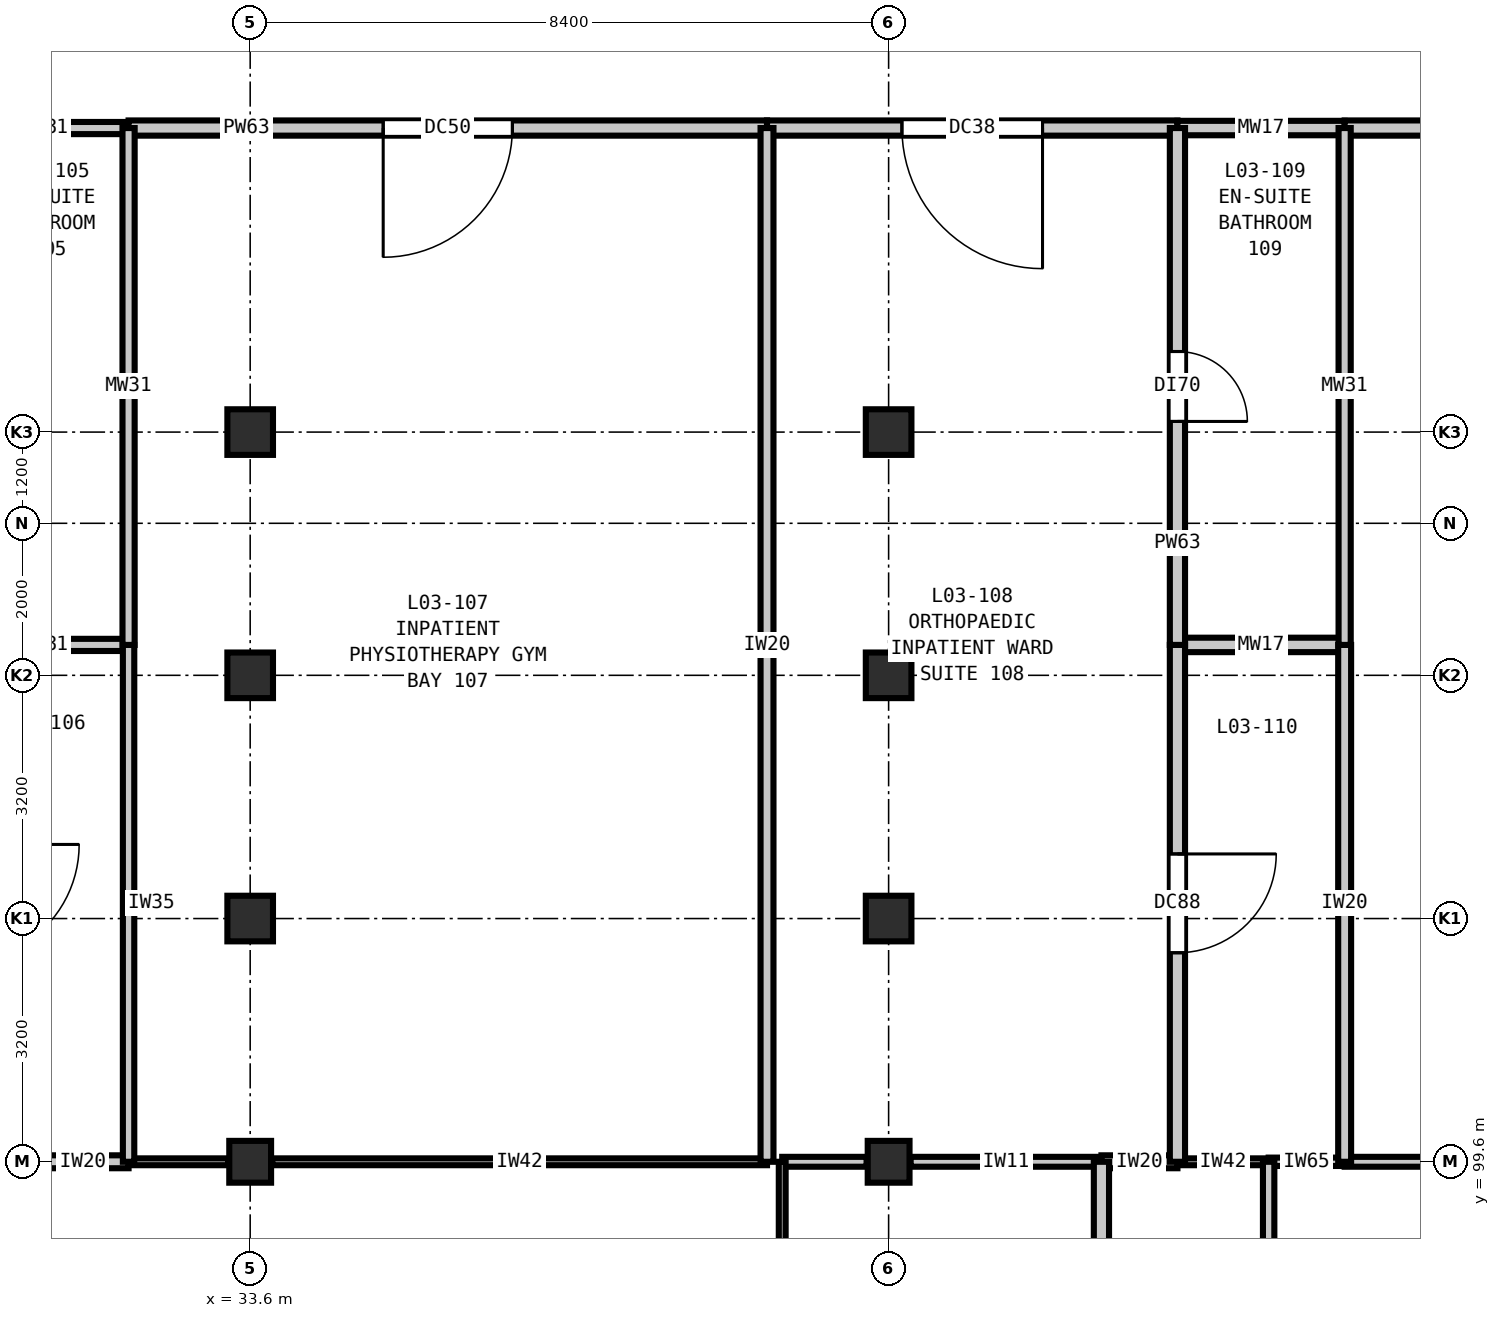
"""IFC4 building model, lengths in metres.
Left out: names, types, materials, properties, quantities, classifications, styles, units other than length and angle.
Written with IfcOpenShell. Run it as: python <this file> out.ifc"""

import sys

from ifc_helpers import new_model, si_unit, direction, frame, frame_2d, origin, origin_2d, place, context, subcontext, project, spatial, rectangle, extrude, element, fill, save


model = new_model("IFC4")
c1 = context("Model", 3, precision=1e-05, world=origin(), true_north=direction((0.0, 1.0)))
c2 = subcontext(c1, "Body", "Model", "MODEL_VIEW")
j1 = project(units=[si_unit("LENGTHUNIT", "METRE"), si_unit("PLANEANGLEUNIT", "RADIAN")], contexts=[c1])
p1 = place(None, origin())
s1 = spatial("IfcSite", under=j1, at=p1, CompositionType="ELEMENT")
p2 = place(p1, origin())
s2 = spatial("IfcBuilding", under=s1, at=p2, CompositionType="ELEMENT")
p3 = place(p2, frame((0.0, 0.0, 16.2)))
s3 = spatial("IfcBuildingStorey", under=s2, at=p3, CompositionType="ELEMENT", Elevation=16.2)
p4 = place(p3, frame((33.6, 99.6, 0.0), z_axis=(0.0, 0.0, 1.0), x_axis=(1.0, 0.0, 0.0)))
e1 = element("IfcColumn", 1, at=p4, inside=s3, PredefinedType="COLUMN", context=c2, shape_type="SweptSolid", body=[
    extrude(rectangle(XDim=0.55, YDim=0.55, at=origin_2d()), origin(), (0.0, 0.0, 1.0), 4.2),
])
for number, where, z_axis, x_axis in (
    (2, (33.6, 102.8, 0.0), (0.0, 0.0, 1.0), (1.0, 0.0, 0.0)),
    (3, (33.6, 106.0, 0.0), (0.0, 0.0, 1.0), (1.0, 0.0, 0.0)),
    (4, (33.6, 109.2, 0.0), (0.0, 0.0, 1.0), (1.0, 0.0, 0.0)),
):
    element("IfcColumn", number, at=place(p3, frame(where, z_axis=z_axis, x_axis=x_axis)), inside=s3, PredefinedType="COLUMN", context=c2, shape_type="SweptSolid", body=[
        extrude(rectangle(XDim=0.6, YDim=0.6, at=origin_2d()), origin(), (0.0, 0.0, 1.0), 4.2),
    ])
p5 = place(p3, frame((42.0, 99.6, 0.0), z_axis=(0.0, 0.0, 1.0), x_axis=(1.0, 0.0, 0.0)))
e5 = element("IfcColumn", 5, at=p5, inside=s3, PredefinedType="COLUMN", context=c2, shape_type="SweptSolid", body=[
    extrude(rectangle(XDim=0.55, YDim=0.55, at=origin_2d()), origin(), (0.0, 0.0, 1.0), 4.2),
])
for number, where, z_axis, x_axis in (
    (6, (42.0, 102.8, 0.0), (0.0, 0.0, 1.0), (1.0, 0.0, 0.0)),
    (7, (42.0, 106.0, 0.0), (0.0, 0.0, 1.0), (1.0, 0.0, 0.0)),
    (8, (42.0, 109.2, 0.0), (0.0, 0.0, 1.0), (1.0, 0.0, 0.0)),
):
    element("IfcColumn", number, at=place(p3, frame(where, z_axis=z_axis, x_axis=x_axis)), inside=s3, PredefinedType="COLUMN", context=c2, shape_type="SweptSolid", body=[
        extrude(rectangle(XDim=0.6, YDim=0.6, at=origin_2d()), origin(), (0.0, 0.0, 1.0), 4.2),
    ])
p6 = place(p3, frame((30.8, 99.6, 0.0), z_axis=(0.0, 0.0, 1.0), x_axis=(1.0, 0.0, 0.0)))
e9 = element("IfcWall", 9, at=p6, inside=s3, PredefinedType="PARTITIONING", context=c2, shape_type="SweptSolid", body=[
    extrude(rectangle(XDim=1.2, YDim=0.17, at=frame_2d((0.6, 0.0))), origin(), (0.0, 0.0, 1.0), 3.535),
])
p7 = place(p3, frame((33.89, 99.6, 0.0), z_axis=(0.0, 0.0, 1.0), x_axis=(1.0, 0.0, 0.0)))
e10 = element("IfcWall", 10, at=p7, inside=s3, PredefinedType="PARTITIONING", context=c2, shape_type="SweptSolid", body=[
    extrude(rectangle(XDim=6.51, YDim=0.09, at=frame_2d((3.255, 0.0))), origin(), (0.0, 0.0, 1.0), 3.535),
])
p8 = place(p3, frame((32.0, 99.6, 0.0), z_axis=(0.0, 0.0, 1.0), x_axis=(1.0, 0.0, 0.0)))
e11 = element("IfcWall", 11, at=p8, inside=s3, PredefinedType="PARTITIONING", context=c2, shape_type="SweptSolid", body=[
    extrude(rectangle(XDim=1.31, YDim=0.09, at=frame_2d((0.655, 0.0))), origin(), (0.0, 0.0, 1.0), 3.535),
])
p9 = place(p3, frame((42.29, 99.6, 0.0), z_axis=(0.0, 0.0, 1.0), x_axis=(1.0, 0.0, 0.0)))
e12 = element("IfcWall", 12, at=p9, inside=s3, PredefinedType="PARTITIONING", context=c2, shape_type="SweptSolid", body=[
    extrude(rectangle(XDim=2.51, YDim=0.13, at=frame_2d((1.255, 0.0))), origin(), (0.0, 0.0, 1.0), 3.535),
])
p10 = place(p3, frame((40.6, 99.6, 0.0), z_axis=(0.0, 0.0, 1.0), x_axis=(1.0, 0.0, 0.0)))
e13 = element("IfcWall", 13, at=p10, inside=s3, PredefinedType="PARTITIONING", context=c2, shape_type="SweptSolid", body=[
    extrude(rectangle(XDim=1.11, YDim=0.13, at=frame_2d((0.555, 0.0))), origin(), (0.0, 0.0, 1.0), 3.535),
])
p11 = place(p3, frame((44.8, 99.6, 0.0), z_axis=(0.0, 0.0, 1.0), x_axis=(1.0, 0.0, 0.0)))
e14 = element("IfcWall", 14, at=p11, inside=s3, PredefinedType="PARTITIONING", context=c2, shape_type="SweptSolid", body=[
    extrude(rectangle(XDim=1.0, YDim=0.17, at=frame_2d((0.5, 0.0))), origin(), (0.0, 0.0, 1.0), 3.535),
])
p12 = place(p3, frame((45.8, 99.6, 0.0), z_axis=(0.0, 0.0, 1.0), x_axis=(1.0, 0.0, 0.0)))
e15 = element("IfcWall", 15, at=p12, inside=s3, PredefinedType="PARTITIONING", context=c2, shape_type="SweptSolid", body=[
    extrude(rectangle(XDim=1.2, YDim=0.09, at=frame_2d((0.6, 0.0))), origin(), (0.0, 0.0, 1.0), 3.535),
])
p13 = place(p3, frame((47.0, 99.6, 0.0), z_axis=(0.0, 0.0, 1.0), x_axis=(1.0, 0.0, 0.0)))
e16 = element("IfcWall", 16, at=p13, inside=s3, PredefinedType="PARTITIONING", context=c2, shape_type="SweptSolid", body=[
    extrude(rectangle(XDim=1.0, YDim=0.11, at=frame_2d((0.5, 0.0))), origin(), (0.0, 0.0, 1.0), 3.535),
])
p14 = place(p3, frame((48.0, 99.6, 0.0), z_axis=(0.0, 0.0, 1.0), x_axis=(1.0, 0.0, 0.0)))
e17 = element("IfcWall", 17, at=p14, inside=s3, PredefinedType="PARTITIONING", context=c2, shape_type="SweptSolid", body=[
    extrude(rectangle(XDim=2.11, YDim=0.13, at=frame_2d((1.055, 0.0))), origin(), (0.0, 0.0, 1.0), 3.535),
])
p15 = place(p3, frame((29.8, 106.4, 0.0), z_axis=(0.0, 0.0, 1.0), x_axis=(1.0, 0.0, 0.0)))
e18 = element("IfcWall", 18, at=p15, inside=s3, PredefinedType="PLUMBINGWALL", context=c2, shape_type="SweptSolid", body=[
    extrude(rectangle(XDim=2.2, YDim=0.16, at=frame_2d((1.1, 0.0))), origin(), (0.0, 0.0, 1.0), 3.89),
])
p16 = place(p3, frame((45.8, 106.4, 0.0), z_axis=(0.0, 0.0, 1.0), x_axis=(1.0, 0.0, 0.0)))
e19 = element("IfcWall", 19, at=p16, inside=s3, PredefinedType="PLUMBINGWALL", context=c2, shape_type="SweptSolid", body=[
    extrude(rectangle(XDim=2.2, YDim=0.19, at=frame_2d((1.1, 0.0))), origin(), (0.0, 0.0, 1.0), 3.89),
])
p17 = place(p3, frame((29.8, 113.2, 0.0), z_axis=(0.0, 0.0, 1.0), x_axis=(1.0, 0.0, 0.0)))
e20 = element("IfcWall", 20, at=p17, inside=s3, PredefinedType="PLUMBINGWALL", context=c2, shape_type="SweptSolid", body=[
    extrude(rectangle(XDim=2.2, YDim=0.16, at=frame_2d((1.1, 0.0))), origin(), (0.0, 0.0, 1.0), 3.89),
])
p18 = place(p3, frame((32.0, 113.2, 0.0), z_axis=(0.0, 0.0, 1.0), x_axis=(1.0, 0.0, 0.0)))
e21 = element("IfcWall", 21, at=p18, inside=s3, PredefinedType="PARTITIONING", context=c2, shape_type="SweptSolid", body=[
    extrude(rectangle(XDim=8.4, YDim=0.2, at=frame_2d((4.2, 0.0))), origin(), (0.0, 0.0, 1.0), 3.89),
])
p19 = place(p18, frame((3.35, 0.0, 0.0)))
e22 = element("IfcOpeningElement", 22, at=p19, cuts=e21, PredefinedType="OPENING", context=c2, shape_type="SweptSolid", body=[
    extrude(rectangle(XDim=1.7, YDim=2.3, at=frame_2d((0.85, 1.15))), frame((0.0, 0.11, 0.0), z_axis=(0.0, -1.0, 0.0), x_axis=(1.0, 0.0, 0.0)), (0.0, 0.0, 1.0), 0.22),
])
p20 = place(p3, frame((40.4, 113.2, 0.0), z_axis=(0.0, 0.0, 1.0), x_axis=(1.0, 0.0, 0.0)))
e23 = element("IfcWall", 23, at=p20, inside=s3, PredefinedType="PARTITIONING", context=c2, shape_type="SweptSolid", body=[
    extrude(rectangle(XDim=5.4, YDim=0.2, at=frame_2d((2.7, 0.0))), origin(), (0.0, 0.0, 1.0), 3.89),
])
p21 = place(p20, frame((1.775, 0.0, 0.0)))
e24 = element("IfcOpeningElement", 24, at=p21, cuts=e23, PredefinedType="OPENING", context=c2, shape_type="SweptSolid", body=[
    extrude(rectangle(XDim=1.85, YDim=2.3, at=frame_2d((0.925, 1.15))), frame((0.0, 0.11, 0.0), z_axis=(0.0, -1.0, 0.0), x_axis=(1.0, 0.0, 0.0)), (0.0, 0.0, 1.0), 0.22),
])
p22 = place(p3, frame((45.8, 113.2, 0.0), z_axis=(0.0, 0.0, 1.0), x_axis=(1.0, 0.0, 0.0)))
e25 = element("IfcWall", 25, at=p22, inside=s3, PredefinedType="PLUMBINGWALL", context=c2, shape_type="SweptSolid", body=[
    extrude(rectangle(XDim=2.2, YDim=0.19, at=frame_2d((1.1, 0.0))), origin(), (0.0, 0.0, 1.0), 3.89),
])
p23 = place(p3, frame((48.0, 113.2, 0.0), z_axis=(0.0, 0.0, 1.0), x_axis=(1.0, 0.0, 0.0)))
e26 = element("IfcWall", 26, at=p23, inside=s3, PredefinedType="PARTITIONING", context=c2, shape_type="SweptSolid", body=[
    extrude(rectangle(XDim=8.4, YDim=0.2, at=frame_2d((4.2, 0.0))), origin(), (0.0, 0.0, 1.0), 3.89),
])
p24 = place(p23, frame((3.575, 0.0, 0.0)))
e27 = element("IfcOpeningElement", 27, at=p24, cuts=e26, PredefinedType="OPENING", context=c2, shape_type="SweptSolid", body=[
    extrude(rectangle(XDim=1.25, YDim=2.15, at=frame_2d((0.625, 1.075))), frame((0.0, 0.11, 0.0), z_axis=(0.0, -1.0, 0.0), x_axis=(1.0, 0.0, 0.0)), (0.0, 0.0, 1.0), 0.22),
])
p25 = place(p3, frame((32.0, 99.6, 0.0), z_axis=(0.0, 0.0, 1.0), x_axis=(0.0, 1.0, 0.0)))
e28 = element("IfcWall", 28, at=p25, inside=s3, PredefinedType="PARTITIONING", context=c2, shape_type="SweptSolid", body=[
    extrude(rectangle(XDim=6.8, YDim=0.15, at=frame_2d((3.4, 0.0))), origin(), (0.0, 0.0, 1.0), 3.89),
])
p26 = place(p3, frame((32.0, 106.4, 0.0), z_axis=(0.0, 0.0, 1.0), x_axis=(0.0, 1.0, 0.0)))
e29 = element("IfcWall", 29, at=p26, inside=s3, PredefinedType="PLUMBINGWALL", context=c2, shape_type="SweptSolid", body=[
    extrude(rectangle(XDim=6.8, YDim=0.16, at=frame_2d((3.4, 0.0))), origin(), (0.0, 0.0, 1.0), 3.89),
])
p27 = place(p3, frame((40.4, 99.6, 0.0), z_axis=(0.0, 0.0, 1.0), x_axis=(0.0, 1.0, 0.0)))
e30 = element("IfcWall", 30, at=p27, inside=s3, PredefinedType="PARTITIONING", context=c2, shape_type="SweptSolid", body=[
    extrude(rectangle(XDim=13.6, YDim=0.17, at=frame_2d((6.8, 0.0))), origin(), (0.0, 0.0, 1.0), 3.89),
])
p28 = place(p3, frame((40.6, 88.6, 0.0), z_axis=(0.0, 0.0, 1.0), x_axis=(0.0, 1.0, 0.0)))
e31 = element("IfcWall", 31, at=p28, inside=s3, PredefinedType="PARTITIONING", context=c2, shape_type="SweptSolid", body=[
    extrude(rectangle(XDim=11.0, YDim=0.09, at=frame_2d((5.5, 0.0))), origin(), (0.0, 0.0, 1.0), 3.89),
])
p29 = place(p3, frame((44.8, 94.1, 0.0), z_axis=(0.0, 0.0, 1.0), x_axis=(0.0, 1.0, 0.0)))
e32 = element("IfcWall", 32, at=p29, inside=s3, PredefinedType="PARTITIONING", context=c2, shape_type="SweptSolid", body=[
    extrude(rectangle(XDim=5.5, YDim=0.2, at=frame_2d((2.75, 0.0))), origin(), (0.0, 0.0, 1.0), 3.89),
])
p30 = place(p29, frame((2.125, 0.0, 0.0)))
e33 = element("IfcOpeningElement", 33, at=p30, cuts=e32, PredefinedType="OPENING", context=c2, shape_type="SweptSolid", body=[
    extrude(rectangle(XDim=1.25, YDim=2.15, at=frame_2d((0.625, 1.075))), frame((0.0, 0.11, 0.0), z_axis=(0.0, -1.0, 0.0), x_axis=(1.0, 0.0, 0.0)), (0.0, 0.0, 1.0), 0.22),
])
p31 = place(p3, frame((45.8, 99.6, 0.0), z_axis=(0.0, 0.0, 1.0), x_axis=(0.0, 1.0, 0.0)))
e34 = element("IfcWall", 34, at=p31, inside=s3, PredefinedType="PARTITIONING", context=c2, shape_type="SweptSolid", body=[
    extrude(rectangle(XDim=6.8, YDim=0.2, at=frame_2d((3.4, 0.0))), origin(), (0.0, 0.0, 1.0), 3.89),
])
p32 = place(p31, frame((2.75, 0.0, 0.0)))
e35 = element("IfcOpeningElement", 35, at=p32, cuts=e34, PredefinedType="OPENING", context=c2, shape_type="SweptSolid", body=[
    extrude(rectangle(XDim=1.3, YDim=2.2, at=frame_2d((0.65, 1.1))), frame((0.0, 0.11, 0.0), z_axis=(0.0, -1.0, 0.0), x_axis=(1.0, 0.0, 0.0)), (0.0, 0.0, 1.0), 0.22),
])
p33 = place(p3, frame((45.8, 106.4, 0.0), z_axis=(0.0, 0.0, 1.0), x_axis=(0.0, 1.0, 0.0)))
e36 = element("IfcWall", 36, at=p33, inside=s3, PredefinedType="PARTITIONING", context=c2, shape_type="SweptSolid", body=[
    extrude(rectangle(XDim=6.8, YDim=0.2, at=frame_2d((3.4, 0.0))), origin(), (0.0, 0.0, 1.0), 3.89),
])
p34 = place(p33, frame((2.94, 0.0, 0.0)))
e37 = element("IfcOpeningElement", 37, at=p34, cuts=e36, PredefinedType="OPENING", context=c2, shape_type="SweptSolid", body=[
    extrude(rectangle(XDim=0.92, YDim=2.1, at=frame_2d((0.46, 1.05))), frame((0.0, 0.11, 0.0), z_axis=(0.0, -1.0, 0.0), x_axis=(1.0, 0.0, 0.0)), (0.0, 0.0, 1.0), 0.22),
])
p35 = place(p3, frame((47.0, 94.1, 0.0), z_axis=(0.0, 0.0, 1.0), x_axis=(0.0, 1.0, 0.0)))
e38 = element("IfcWall", 38, at=p35, inside=s3, PredefinedType="PARTITIONING", context=c2, shape_type="SweptSolid", body=[
    extrude(rectangle(XDim=5.5, YDim=0.15, at=frame_2d((2.75, 0.0))), origin(), (0.0, 0.0, 1.0), 3.89),
])
p36 = place(p3, frame((48.0, 99.6, 0.0), z_axis=(0.0, 0.0, 1.0), x_axis=(0.0, 1.0, 0.0)))
e39 = element("IfcWall", 39, at=p36, inside=s3, PredefinedType="PARTITIONING", context=c2, shape_type="SweptSolid", body=[
    extrude(rectangle(XDim=6.8, YDim=0.17, at=frame_2d((3.4, 0.0))), origin(), (0.0, 0.0, 1.0), 3.89),
])
p37 = place(p3, frame((48.0, 106.4, 0.0), z_axis=(0.0, 0.0, 1.0), x_axis=(0.0, 1.0, 0.0)))
e40 = element("IfcWall", 40, at=p37, inside=s3, PredefinedType="PLUMBINGWALL", context=c2, shape_type="SweptSolid", body=[
    extrude(rectangle(XDim=6.8, YDim=0.16, at=frame_2d((3.4, 0.0))), origin(), (0.0, 0.0, 1.0), 3.89),
])
p38 = place(p19, frame((1.7, 0.0, 0.0), z_axis=(0.0, 0.0, 1.0), x_axis=(-1.0, 0.0, 0.0)))
e41 = element("IfcDoor", 41, at=p38, inside=s3, OperationType="SINGLE_SWING_RIGHT", PredefinedType="DOOR", context=c2, shape_type="SweptSolid", body=[
    extrude(rectangle(XDim=1.7, YDim=2.3, at=frame_2d((0.85, 1.15))), frame((0.0, 0.025, 0.0), z_axis=(0.0, -1.0, 0.0), x_axis=(1.0, 0.0, 0.0)), (0.0, 0.0, 1.0), 0.05),
])
fill(e22, e41)
p39 = place(p21, frame((1.85, 0.0, 0.0), z_axis=(0.0, 0.0, 1.0), x_axis=(-1.0, 0.0, 0.0)))
e42 = element("IfcDoor", 42, at=p39, inside=s3, OperationType="SINGLE_SWING_LEFT", PredefinedType="DOOR", context=c2, shape_type="SweptSolid", body=[
    extrude(rectangle(XDim=1.85, YDim=2.3, at=frame_2d((0.925, 1.15))), frame((0.0, 0.025, 0.0), z_axis=(0.0, -1.0, 0.0), x_axis=(1.0, 0.0, 0.0)), (0.0, 0.0, 1.0), 0.05),
])
fill(e24, e42)
p40 = place(p32, frame((1.3, 0.0, 0.0), z_axis=(0.0, 0.0, 1.0), x_axis=(-1.0, 0.0, 0.0)))
e43 = element("IfcDoor", 43, at=p40, inside=s3, OperationType="SINGLE_SWING_LEFT", PredefinedType="DOOR", context=c2, shape_type="SweptSolid", body=[
    extrude(rectangle(XDim=1.3, YDim=2.2, at=frame_2d((0.65, 1.1))), frame((0.0, 0.025, 0.0), z_axis=(0.0, -1.0, 0.0), x_axis=(1.0, 0.0, 0.0)), (0.0, 0.0, 1.0), 0.05),
])
fill(e35, e43)
p41 = place(p34, frame((0.92, 0.0, 0.0), z_axis=(0.0, 0.0, 1.0), x_axis=(-1.0, 0.0, 0.0)))
e44 = element("IfcDoor", 44, at=p41, inside=s3, OperationType="SINGLE_SWING_RIGHT", PredefinedType="DOOR", context=c2, shape_type="SweptSolid", body=[
    extrude(rectangle(XDim=0.92, YDim=2.1, at=frame_2d((0.46, 1.05))), frame((0.0, 0.025, 0.0), z_axis=(0.0, -1.0, 0.0), x_axis=(1.0, 0.0, 0.0)), (0.0, 0.0, 1.0), 0.05),
])
fill(e37, e44)
save(model, sys.argv[1])
